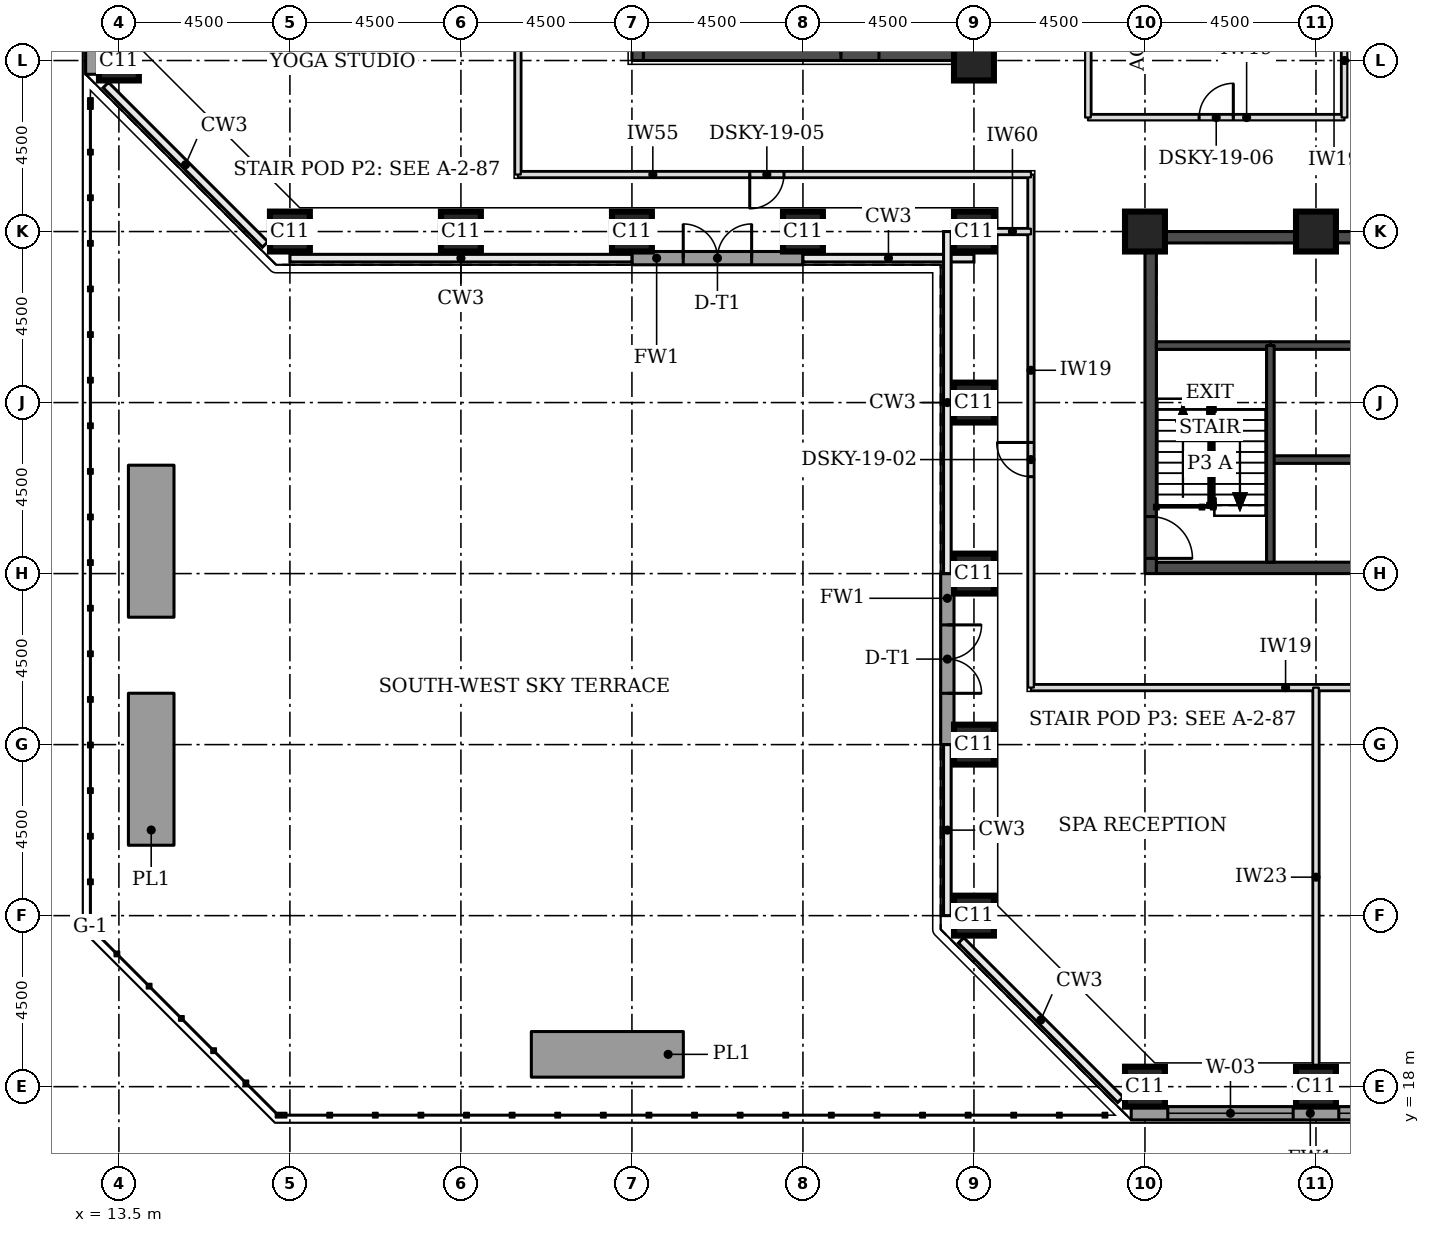
"""IFC4 building model, lengths in metres.
Left out: names, types, materials, properties, quantities, classifications, styles, units other than length and angle.
Written with IfcOpenShell. Run it as: python <this file> out.ifc"""

import sys

from ifc_helpers import new_model, si_unit, direction, frame, frame_2d, origin, origin_2d, place, context, subcontext, project, spatial, rectangle, extrude, element, fill, save


model = new_model("IFC4")
c1 = context("Model", 3, precision=1e-05, world=origin(), true_north=direction((0.0, 1.0)))
c2 = subcontext(c1, "Body", "Model", "MODEL_VIEW")
j1 = project(units=[si_unit("LENGTHUNIT", "METRE"), si_unit("PLANEANGLEUNIT", "RADIAN")], contexts=[c1])
p1 = place(None, origin())
s1 = spatial("IfcSite", under=j1, at=p1, CompositionType="ELEMENT")
p2 = place(p1, origin())
s2 = spatial("IfcBuilding", under=s1, at=p2, CompositionType="ELEMENT")
p3 = place(p2, frame((0.0, 0.0, 74.3)))
s3 = spatial("IfcBuildingStorey", under=s2, at=p3, CompositionType="ELEMENT", Elevation=74.3)
for number, where, z_axis, x_axis in (
    (1, (40.5, 18.0, 0.0), (0.0, 0.0, 1.0), (1.0, 0.0, 0.0)),
    (2, (45.0, 18.0, 0.0), (0.0, 0.0, 1.0), (1.0, 0.0, 0.0)),
    (3, (36.0, 22.5, 0.0), (0.0, 0.0, 1.0), (1.0, 0.0, 0.0)),
    (4, (36.0, 27.0, 0.0), (0.0, 0.0, 1.0), (1.0, 0.0, 0.0)),
    (5, (36.0, 31.5, 0.0), (0.0, 0.0, 1.0), (1.0, 0.0, 0.0)),
    (6, (36.0, 36.0, 0.0), (0.0, 0.0, 1.0), (1.0, 0.0, 0.0)),
    (7, (18.0, 40.5, 0.0), (0.0, 0.0, 1.0), (1.0, 0.0, 0.0)),
    (8, (22.5, 40.5, 0.0), (0.0, 0.0, 1.0), (1.0, 0.0, 0.0)),
    (9, (27.0, 40.5, 0.0), (0.0, 0.0, 1.0), (1.0, 0.0, 0.0)),
    (10, (31.5, 40.5, 0.0), (0.0, 0.0, 1.0), (1.0, 0.0, 0.0)),
    (11, (36.0, 40.5, 0.0), (0.0, 0.0, 1.0), (1.0, 0.0, 0.0)),
    (12, (40.5, 40.5, 0.0), (0.0, 0.0, 1.0), (1.0, 0.0, 0.0)),
    (13, (45.0, 40.5, 0.0), (0.0, 0.0, 1.0), (1.0, 0.0, 0.0)),
    (14, (13.5, 45.0, 0.0), (0.0, 0.0, 1.0), (1.0, 0.0, 0.0)),
    (15, (36.0, 45.0, 0.0), (0.0, 0.0, 1.0), (1.0, 0.0, 0.0)),
):
    element("IfcColumn", number, at=place(p3, frame(where, z_axis=z_axis, x_axis=x_axis)), inside=s3, PredefinedType="COLUMN", context=c2, shape_type="SweptSolid", body=[
        extrude(rectangle(XDim=1.05, YDim=1.05, at=origin_2d()), origin(), (0.0, 0.0, 1.0), 4.6),
    ])
p4 = place(p3, frame((27.3, 45.15, 0.0), z_axis=(0.0, 0.0, 1.0), x_axis=(1.0, 0.0, 0.0)))
e16 = element("IfcWall", 16, at=p4, inside=s3, PredefinedType="SHEAR", context=c2, shape_type="SweptSolid", body=[
    extrude(rectangle(XDim=8.4, YDim=0.3, at=frame_2d((4.2, 0.0))), origin(), (0.0, 0.0, 1.0), 4.6),
])
p5 = place(p4, frame((5.2, 0.0, 0.0)))
e17 = element("IfcOpeningElement", 17, at=p5, cuts=e16, PredefinedType="OPENING", context=c2, shape_type="SweptSolid", body=[
    extrude(rectangle(XDim=1.0, YDim=2.1, at=frame_2d((0.5, 1.05))), frame((0.0, 0.16, 0.0), z_axis=(0.0, -1.0, 0.0), x_axis=(1.0, 0.0, 0.0)), (0.0, 0.0, 1.0), 0.32),
])
p6 = place(p3, frame((27.15, 45.0, 0.0), z_axis=(0.0, 0.0, 1.0), x_axis=(0.0, 1.0, 0.0)))
e18 = element("IfcWall", 18, at=p6, inside=s3, PredefinedType="SHEAR", context=c2, shape_type="SweptSolid", body=[
    extrude(rectangle(XDim=9.0, YDim=0.3, at=frame_2d((4.5, 0.0))), origin(), (0.0, 0.0, 1.0), 4.6),
])
p7 = place(p6, frame((0.4, 0.0, 0.0)))
e19 = element("IfcOpeningElement", 19, at=p7, cuts=e18, PredefinedType="OPENING", context=c2, shape_type="SweptSolid", body=[
    extrude(rectangle(XDim=1.1, YDim=2.1, at=frame_2d((0.55, 1.05))), frame((0.0, 0.16, 0.0), z_axis=(0.0, -1.0, 0.0), x_axis=(1.0, 0.0, 0.0)), (0.0, 0.0, 1.0), 0.32),
])
p8 = place(p3, frame((35.85, 45.0, 0.0), z_axis=(0.0, 0.0, 1.0), x_axis=(0.0, 1.0, 0.0)))
e20 = element("IfcWall", 20, at=p8, inside=s3, PredefinedType="SHEAR", context=c2, shape_type="SweptSolid", body=[
    extrude(rectangle(XDim=9.0, YDim=0.3, at=frame_2d((4.5, 0.0))), origin(), (0.0, 0.0, 1.0), 4.6),
])
p9 = place(p3, frame((40.8, 31.65, 0.0), z_axis=(0.0, 0.0, 1.0), x_axis=(1.0, 0.0, 0.0)))
e21 = element("IfcWall", 21, at=p9, inside=s3, PredefinedType="SHEAR", context=c2, shape_type="SweptSolid", body=[
    extrude(rectangle(XDim=8.4, YDim=0.3, at=frame_2d((4.2, 0.0))), origin(), (0.0, 0.0, 1.0), 4.6),
])
p10 = place(p9, frame((5.2, 0.0, 0.0)))
e22 = element("IfcOpeningElement", 22, at=p10, cuts=e21, PredefinedType="OPENING", context=c2, shape_type="SweptSolid", body=[
    extrude(rectangle(XDim=1.0, YDim=2.1, at=frame_2d((0.5, 1.05))), frame((0.0, 0.16, 0.0), z_axis=(0.0, -1.0, 0.0), x_axis=(1.0, 0.0, 0.0)), (0.0, 0.0, 1.0), 0.32),
])
p11 = place(p3, frame((40.8, 40.35, 0.0), z_axis=(0.0, 0.0, 1.0), x_axis=(1.0, 0.0, 0.0)))
e23 = element("IfcWall", 23, at=p11, inside=s3, PredefinedType="SHEAR", context=c2, shape_type="SweptSolid", body=[
    extrude(rectangle(XDim=8.4, YDim=0.3, at=frame_2d((4.2, 0.0))), origin(), (0.0, 0.0, 1.0), 4.6),
])
p12 = place(p11, frame((6.4, 0.0, 0.0)))
e24 = element("IfcOpeningElement", 24, at=p12, cuts=e23, PredefinedType="OPENING", context=c2, shape_type="SweptSolid", body=[
    extrude(rectangle(XDim=1.1, YDim=2.1, at=frame_2d((0.55, 1.05))), frame((0.0, 0.16, 0.0), z_axis=(0.0, -1.0, 0.0), x_axis=(1.0, 0.0, 0.0)), (0.0, 0.0, 1.0), 0.32),
])
p13 = place(p3, frame((40.65, 31.5, 0.0), z_axis=(0.0, 0.0, 1.0), x_axis=(0.0, 1.0, 0.0)))
e25 = element("IfcWall", 25, at=p13, inside=s3, PredefinedType="SHEAR", context=c2, shape_type="SweptSolid", body=[
    extrude(rectangle(XDim=9.0, YDim=0.3, at=frame_2d((4.5, 0.0))), origin(), (0.0, 0.0, 1.0), 4.6),
])
p14 = place(p13, frame((0.4, 0.0, 0.0)))
e26 = element("IfcOpeningElement", 26, at=p14, cuts=e25, PredefinedType="OPENING", context=c2, shape_type="SweptSolid", body=[
    extrude(rectangle(XDim=1.1, YDim=2.1, at=frame_2d((0.55, 1.05))), frame((0.0, 0.16, 0.0), z_axis=(0.0, -1.0, 0.0), x_axis=(1.0, 0.0, 0.0)), (0.0, 0.0, 1.0), 0.32),
])
p15 = place(p3, frame((12.8, 58.862, 0.0), z_axis=(0.0, 0.0, 1.0), x_axis=(0.0, -1.0, 0.0)))
e27 = element("IfcWall", 27, at=p15, inside=s3, PredefinedType="STANDARD", context=c2, shape_type="SweptSolid", body=[
    extrude(rectangle(XDim=14.225, YDim=0.35, at=frame_2d((7.112, 0.0))), origin(), (0.0, 0.0, 1.0), 4.425),
])
p16 = place(p15, frame((0.962, 0.0, 0.9)))
e28 = element("IfcOpeningElement", 28, at=p16, cuts=e27, PredefinedType="OPENING", context=c2, shape_type="SweptSolid", body=[
    extrude(rectangle(XDim=3.3, YDim=2.7, at=frame_2d((1.65, 1.35))), frame((0.0, 0.185, 0.0), z_axis=(0.0, -1.0, 0.0), x_axis=(1.0, 0.0, 0.0)), (0.0, 0.0, 1.0), 0.37),
])
p17 = place(p15, frame((5.462, 0.0, 0.9)))
e29 = element("IfcOpeningElement", 29, at=p17, cuts=e27, PredefinedType="OPENING", context=c2, shape_type="SweptSolid", body=[
    extrude(rectangle(XDim=3.3, YDim=2.7, at=frame_2d((1.65, 1.35))), frame((0.0, 0.185, 0.0), z_axis=(0.0, -1.0, 0.0), x_axis=(1.0, 0.0, 0.0)), (0.0, 0.0, 1.0), 0.37),
])
p18 = place(p15, frame((9.962, 0.0, 0.9)))
e30 = element("IfcOpeningElement", 30, at=p18, cuts=e27, PredefinedType="OPENING", context=c2, shape_type="SweptSolid", body=[
    extrude(rectangle(XDim=3.3, YDim=2.7, at=frame_2d((1.65, 1.35))), frame((0.0, 0.185, 0.0), z_axis=(0.0, -1.0, 0.0), x_axis=(1.0, 0.0, 0.0)), (0.0, 0.0, 1.0), 0.37),
])
p19 = place(p3, frame((27.0, 39.8, 0.0), z_axis=(0.0, 0.0, 1.0), x_axis=(1.0, 0.0, 0.0)))
e31 = element("IfcWall", 31, at=p19, inside=s3, PredefinedType="STANDARD", context=c2, shape_type="SweptSolid", body=[
    extrude(rectangle(XDim=4.5, YDim=0.35, at=frame_2d((2.25, 0.0))), origin(), (0.0, 0.0, 1.0), 4.425),
])
p20 = place(p19, frame((1.35, 0.0, 0.0)))
e32 = element("IfcOpeningElement", 32, at=p20, cuts=e31, PredefinedType="OPENING", context=c2, shape_type="SweptSolid", body=[
    extrude(rectangle(XDim=1.8, YDim=2.4, at=frame_2d((0.9, 1.2))), frame((0.0, 0.185, 0.0), z_axis=(0.0, -1.0, 0.0), x_axis=(1.0, 0.0, 0.0)), (0.0, 0.0, 1.0), 0.37),
])
p21 = place(p3, frame((35.3, 31.5, 0.0), z_axis=(0.0, 0.0, 1.0), x_axis=(0.0, -1.0, 0.0)))
e33 = element("IfcWall", 33, at=p21, inside=s3, PredefinedType="STANDARD", context=c2, shape_type="SweptSolid", body=[
    extrude(rectangle(XDim=4.5, YDim=0.35, at=frame_2d((2.25, 0.0))), origin(), (0.0, 0.0, 1.0), 4.425),
])
p22 = place(p21, frame((1.35, 0.0, 0.0)))
e34 = element("IfcOpeningElement", 34, at=p22, cuts=e33, PredefinedType="OPENING", context=c2, shape_type="SweptSolid", body=[
    extrude(rectangle(XDim=1.8, YDim=2.4, at=frame_2d((0.9, 1.2))), frame((0.0, 0.185, 0.0), z_axis=(0.0, -1.0, 0.0), x_axis=(1.0, 0.0, 0.0)), (0.0, 0.0, 1.0), 0.37),
])
p23 = place(p3, frame((40.138, 17.3, 0.0), z_axis=(0.0, 0.0, 1.0), x_axis=(1.0, 0.0, 0.0)))
e35 = element("IfcWall", 35, at=p23, inside=s3, PredefinedType="STANDARD", context=c2, shape_type="SweptSolid", body=[
    extrude(rectangle(XDim=14.225, YDim=0.35, at=frame_2d((7.112, 0.0))), origin(), (0.0, 0.0, 1.0), 4.425),
])
p24 = place(p23, frame((0.962, 0.0, 0.9)))
e36 = element("IfcOpeningElement", 36, at=p24, cuts=e35, PredefinedType="OPENING", context=c2, shape_type="SweptSolid", body=[
    extrude(rectangle(XDim=3.3, YDim=2.7, at=frame_2d((1.65, 1.35))), frame((0.0, 0.185, 0.0), z_axis=(0.0, -1.0, 0.0), x_axis=(1.0, 0.0, 0.0)), (0.0, 0.0, 1.0), 0.37),
])
p25 = place(p23, frame((5.462, 0.0, 0.9)))
e37 = element("IfcOpeningElement", 37, at=p25, cuts=e35, PredefinedType="OPENING", context=c2, shape_type="SweptSolid", body=[
    extrude(rectangle(XDim=3.3, YDim=2.7, at=frame_2d((1.65, 1.35))), frame((0.0, 0.185, 0.0), z_axis=(0.0, -1.0, 0.0), x_axis=(1.0, 0.0, 0.0)), (0.0, 0.0, 1.0), 0.37),
])
p26 = place(p23, frame((9.962, 0.0, 0.9)))
e38 = element("IfcOpeningElement", 38, at=p26, cuts=e35, PredefinedType="OPENING", context=c2, shape_type="SweptSolid", body=[
    extrude(rectangle(XDim=3.3, YDim=2.7, at=frame_2d((1.65, 1.35))), frame((0.0, 0.185, 0.0), z_axis=(0.0, -1.0, 0.0), x_axis=(1.0, 0.0, 0.0)), (0.0, 0.0, 1.0), 0.37),
])
for number, where, z_axis, x_axis in (
    (39, (28.353, 18.85, 0.0), (0.0, 0.0, 1.0), (-1.0, 0.0, 0.0)),
    (40, (14.35, 24.352, 0.0), (0.0, 0.0, 1.0), (0.0, 1.0, 0.0)),
    (41, (14.35, 30.352, 0.0), (0.0, 0.0, 1.0), (0.0, 1.0, 0.0)),
):
    element("IfcWall", number, at=place(p3, frame(where, z_axis=z_axis, x_axis=x_axis)), inside=s3, PredefinedType="STANDARD", context=c2, shape_type="SweptSolid", body=[
        extrude(rectangle(XDim=4.0, YDim=1.2, at=frame_2d((2.0, 0.0))), origin(), (0.0, 0.0, 1.0), 0.6),
    ])
p27 = place(p3, frame((37.5, 28.5, 0.0), z_axis=(0.0, 0.0, 1.0), x_axis=(1.0, 0.0, 0.0)))
e42 = element("IfcWall", 42, at=p27, inside=s3, PredefinedType="PARTITIONING", context=c2, shape_type="SweptSolid", body=[
    extrude(rectangle(XDim=15.0, YDim=0.15, at=frame_2d((7.5, 0.0))), origin(), (0.0, 0.0, 1.0), 4.45),
])
p28 = place(p27, frame((10.35, 0.0, 0.0)))
e43 = element("IfcOpeningElement", 43, at=p28, cuts=e42, PredefinedType="OPENING", context=c2, shape_type="SweptSolid", body=[
    extrude(rectangle(XDim=1.8, YDim=2.4, at=frame_2d((0.9, 1.2))), frame((0.0, 0.085, 0.0), z_axis=(0.0, -1.0, 0.0), x_axis=(1.0, 0.0, 0.0)), (0.0, 0.0, 1.0), 0.17),
])
p29 = place(p3, frame((37.5, 28.5, 0.0), z_axis=(0.0, 0.0, 1.0), x_axis=(0.0, 1.0, 0.0)))
e44 = element("IfcWall", 44, at=p29, inside=s3, PredefinedType="PARTITIONING", context=c2, shape_type="SweptSolid", body=[
    extrude(rectangle(XDim=13.5, YDim=0.15, at=frame_2d((6.75, 0.0))), origin(), (0.0, 0.0, 1.0), 4.45),
])
p30 = place(p29, frame((5.55, 0.0, 0.0)))
e45 = element("IfcOpeningElement", 45, at=p30, cuts=e44, PredefinedType="OPENING", context=c2, shape_type="SweptSolid", body=[
    extrude(rectangle(XDim=0.9, YDim=2.1, at=frame_2d((0.45, 1.05))), frame((0.0, 0.085, 0.0), z_axis=(0.0, -1.0, 0.0), x_axis=(1.0, 0.0, 0.0)), (0.0, 0.0, 1.0), 0.17),
])
p31 = place(p3, frame((24.0, 42.0, 0.0), z_axis=(0.0, 0.0, 1.0), x_axis=(1.0, 0.0, 0.0)))
e46 = element("IfcWall", 46, at=p31, inside=s3, PredefinedType="PARTITIONING", context=c2, shape_type="SweptSolid", body=[
    extrude(rectangle(XDim=13.5, YDim=0.15, at=frame_2d((6.75, 0.0))), origin(), (0.0, 0.0, 1.0), 3.922),
])
p32 = place(p31, frame((6.1, 0.0, 0.0)))
e47 = element("IfcOpeningElement", 47, at=p32, cuts=e46, PredefinedType="OPENING", context=c2, shape_type="SweptSolid", body=[
    extrude(rectangle(XDim=0.9, YDim=2.1, at=frame_2d((0.45, 1.05))), frame((0.0, 0.085, 0.0), z_axis=(0.0, -1.0, 0.0), x_axis=(1.0, 0.0, 0.0)), (0.0, 0.0, 1.0), 0.17),
])
p33 = place(p3, frame((24.0, 42.0, 0.0), z_axis=(0.0, 0.0, 1.0), x_axis=(0.0, 1.0, 0.0)))
e48 = element("IfcWall", 48, at=p33, inside=s3, PredefinedType="PARTITIONING", context=c2, shape_type="SweptSolid", body=[
    extrude(rectangle(XDim=7.5, YDim=0.15, at=frame_2d((3.75, 0.0))), origin(), (0.0, 0.0, 1.0), 4.45),
])
p34 = place(p3, frame((39.0, 43.5, 0.0), z_axis=(0.0, 0.0, 1.0), x_axis=(1.0, 0.0, 0.0)))
e49 = element("IfcWall", 49, at=p34, inside=s3, PredefinedType="PARTITIONING", context=c2, shape_type="SweptSolid", body=[
    extrude(rectangle(XDim=6.75, YDim=0.15, at=frame_2d((3.375, 0.0))), origin(), (0.0, 0.0, 1.0), 4.45),
])
p35 = place(p34, frame((2.925, 0.0, 0.0)))
e50 = element("IfcOpeningElement", 50, at=p35, cuts=e49, PredefinedType="OPENING", context=c2, shape_type="SweptSolid", body=[
    extrude(rectangle(XDim=0.9, YDim=2.1, at=frame_2d((0.45, 1.05))), frame((0.0, 0.085, 0.0), z_axis=(0.0, -1.0, 0.0), x_axis=(1.0, 0.0, 0.0)), (0.0, 0.0, 1.0), 0.17),
])
p36 = place(p3, frame((39.0, 43.5, 0.0), z_axis=(0.0, 0.0, 1.0), x_axis=(0.0, 1.0, 0.0)))
e51 = element("IfcWall", 51, at=p36, inside=s3, PredefinedType="PARTITIONING", context=c2, shape_type="SweptSolid", body=[
    extrude(rectangle(XDim=6.75, YDim=0.15, at=frame_2d((3.375, 0.0))), origin(), (0.0, 0.0, 1.0), 4.45),
])
p37 = place(p3, frame((45.75, 43.5, 0.0), z_axis=(0.0, 0.0, 1.0), x_axis=(0.0, 1.0, 0.0)))
e52 = element("IfcWall", 52, at=p37, inside=s3, PredefinedType="PARTITIONING", context=c2, shape_type="SweptSolid", body=[
    extrude(rectangle(XDim=3.0, YDim=0.15, at=frame_2d((1.5, 0.0))), origin(), (0.0, 0.0, 1.0), 4.45),
])
p38 = place(p3, frame((45.0, 18.525, 0.0), z_axis=(0.0, 0.0, 1.0), x_axis=(0.0, 1.0, 0.0)))
e53 = element("IfcWall", 53, at=p38, inside=s3, PredefinedType="PARTITIONING", context=c2, shape_type="SweptSolid", body=[
    extrude(rectangle(XDim=9.975, YDim=0.15, at=frame_2d((4.988, 0.0))), origin(), (0.0, 0.0, 1.0), 4.45),
])
p39 = place(p3, frame((36.525, 40.5, 0.0), z_axis=(0.0, 0.0, 1.0), x_axis=(1.0, 0.0, 0.0)))
e54 = element("IfcWall", 54, at=p39, inside=s3, PredefinedType="PARTITIONING", context=c2, shape_type="SweptSolid", body=[
    extrude(rectangle(XDim=0.975, YDim=0.15, at=frame_2d((0.488, 0.0))), origin(), (0.0, 0.0, 1.0), 3.7),
])
p40 = place(p3, frame((43.8, 34.5, 0.0), z_axis=(0.0, 0.0, 1.0), x_axis=(1.0, 0.0, 0.0)))
e55 = element("IfcWall", 55, at=p40, inside=s3, PredefinedType="SOLIDWALL", context=c2, shape_type="SweptSolid", body=[
    extrude(rectangle(XDim=2.4, YDim=0.2, at=frame_2d((1.2, 0.0))), origin(), (0.0, 0.0, 1.0), 4.45),
])
p41 = place(p3, frame((43.8, 37.5, 0.0), z_axis=(0.0, 0.0, 1.0), x_axis=(1.0, 0.0, 0.0)))
e56 = element("IfcWall", 56, at=p41, inside=s3, PredefinedType="SOLIDWALL", context=c2, shape_type="SweptSolid", body=[
    extrude(rectangle(XDim=2.4, YDim=0.2, at=frame_2d((1.2, 0.0))), origin(), (0.0, 0.0, 1.0), 4.6),
])
p42 = place(p3, frame((40.8, 37.5, 0.0), z_axis=(0.0, 0.0, 1.0), x_axis=(1.0, 0.0, 0.0)))
e57 = element("IfcWall", 57, at=p42, inside=s3, PredefinedType="SOLIDWALL", context=c2, shape_type="SweptSolid", body=[
    extrude(rectangle(XDim=3.0, YDim=0.2, at=frame_2d((1.5, 0.0))), origin(), (0.0, 0.0, 1.0), 4.45),
])
p43 = place(p3, frame((43.8, 31.8, 0.0), z_axis=(0.0, 0.0, 1.0), x_axis=(0.0, 1.0, 0.0)))
e58 = element("IfcWall", 58, at=p43, inside=s3, PredefinedType="SOLIDWALL", context=c2, shape_type="SweptSolid", body=[
    extrude(rectangle(XDim=5.7, YDim=0.2, at=frame_2d((2.85, 0.0))), origin(), (0.0, 0.0, 1.0), 4.45),
])
p44 = place(p20, origin())
e59 = element("IfcDoor", 59, at=p44, inside=s3, OperationType="DOUBLE_DOOR_SINGLE_SWING", PredefinedType="DOOR", context=c2, shape_type="SweptSolid", body=[
    extrude(rectangle(XDim=1.8, YDim=2.4, at=frame_2d((0.9, 1.2))), frame((0.0, 0.08, 0.0), z_axis=(0.0, -1.0, 0.0), x_axis=(1.0, 0.0, 0.0)), (0.0, 0.0, 1.0), 0.05),
])
fill(e32, e59)
p45 = place(p22, origin())
e60 = element("IfcDoor", 60, at=p45, inside=s3, OperationType="DOUBLE_DOOR_SINGLE_SWING", PredefinedType="DOOR", context=c2, shape_type="SweptSolid", body=[
    extrude(rectangle(XDim=1.8, YDim=2.4, at=frame_2d((0.9, 1.2))), frame((0.0, 0.08, 0.0), z_axis=(0.0, -1.0, 0.0), x_axis=(1.0, 0.0, 0.0)), (0.0, 0.0, 1.0), 0.05),
])
fill(e34, e60)
p46 = place(p24, origin())
e61 = element("IfcWindow", 61, at=p46, inside=s3, PartitioningType="SINGLE_PANEL", PredefinedType="WINDOW", context=c2, shape_type="SweptSolid", body=[
    extrude(rectangle(XDim=3.3, YDim=2.7, at=frame_2d((1.65, 1.35))), frame((0.0, 0.085, 0.0), z_axis=(0.0, -1.0, 0.0), x_axis=(1.0, 0.0, 0.0)), (0.0, 0.0, 1.0), 0.06),
])
fill(e36, e61)
p47 = place(p25, origin())
e62 = element("IfcWindow", 62, at=p47, inside=s3, PartitioningType="SINGLE_PANEL", PredefinedType="WINDOW", context=c2, shape_type="SweptSolid", body=[
    extrude(rectangle(XDim=3.3, YDim=2.7, at=frame_2d((1.65, 1.35))), frame((0.0, 0.085, 0.0), z_axis=(0.0, -1.0, 0.0), x_axis=(1.0, 0.0, 0.0)), (0.0, 0.0, 1.0), 0.06),
])
fill(e37, e62)
p48 = place(p30, origin())
e63 = element("IfcDoor", 63, at=p48, inside=s3, OperationType="SINGLE_SWING_RIGHT", PredefinedType="DOOR", context=c2, shape_type="SweptSolid", body=[
    extrude(rectangle(XDim=0.9, YDim=2.1, at=frame_2d((0.45, 1.05))), frame((0.0, 0.025, 0.0), z_axis=(0.0, -1.0, 0.0), x_axis=(1.0, 0.0, 0.0)), (0.0, 0.0, 1.0), 0.05),
])
fill(e45, e63)
p49 = place(p32, frame((0.9, 0.0, 0.0), z_axis=(0.0, 0.0, 1.0), x_axis=(-1.0, 0.0, 0.0)))
e64 = element("IfcDoor", 64, at=p49, inside=s3, OperationType="SINGLE_SWING_RIGHT", PredefinedType="DOOR", context=c2, shape_type="SweptSolid", body=[
    extrude(rectangle(XDim=0.9, YDim=2.1, at=frame_2d((0.45, 1.05))), frame((0.0, 0.025, 0.0), z_axis=(0.0, -1.0, 0.0), x_axis=(1.0, 0.0, 0.0)), (0.0, 0.0, 1.0), 0.05),
])
fill(e47, e64)
p50 = place(p35, origin())
e65 = element("IfcDoor", 65, at=p50, inside=s3, OperationType="SINGLE_SWING_RIGHT", PredefinedType="DOOR", context=c2, shape_type="SweptSolid", body=[
    extrude(rectangle(XDim=0.9, YDim=2.1, at=frame_2d((0.45, 1.05))), frame((0.0, 0.025, 0.0), z_axis=(0.0, -1.0, 0.0), x_axis=(1.0, 0.0, 0.0)), (0.0, 0.0, 1.0), 0.05),
])
fill(e50, e65)
p51 = place(p5, origin())
e66 = element("IfcDoor", 66, at=p51, inside=s3, OperationType="SINGLE_SWING_LEFT", PredefinedType="DOOR", context=c2, shape_type="SweptSolid", body=[
    extrude(rectangle(XDim=1.0, YDim=2.1, at=frame_2d((0.5, 1.05))), frame((0.0, 0.025, 0.0), z_axis=(0.0, -1.0, 0.0), x_axis=(1.0, 0.0, 0.0)), (0.0, 0.0, 1.0), 0.05),
])
fill(e17, e66)
p52 = place(p14, frame((1.1, 0.0, 0.0), z_axis=(0.0, 0.0, 1.0), x_axis=(-1.0, 0.0, 0.0)))
e67 = element("IfcDoor", 67, at=p52, inside=s3, OperationType="SINGLE_SWING_RIGHT", PredefinedType="DOOR", context=c2, shape_type="SweptSolid", body=[
    extrude(rectangle(XDim=1.1, YDim=2.1, at=frame_2d((0.55, 1.05))), frame((0.0, 0.025, 0.0), z_axis=(0.0, -1.0, 0.0), x_axis=(1.0, 0.0, 0.0)), (0.0, 0.0, 1.0), 0.05),
])
fill(e26, e67)
save(model, sys.argv[1])
